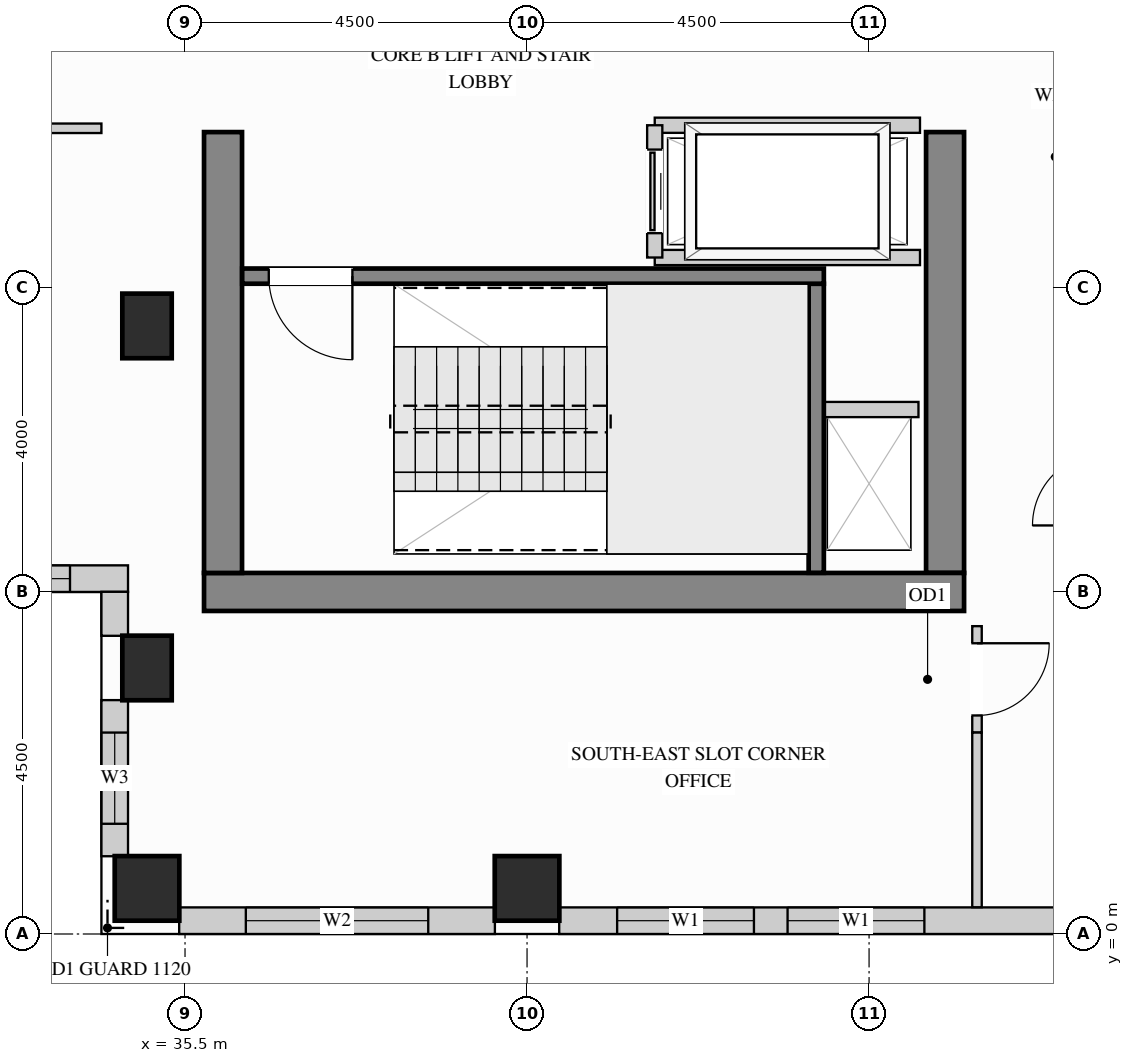
"""IFC4 building model, lengths in metres.
Left out: names, types, materials, properties, quantities, classifications, styles, units other than length and angle.
Written with IfcOpenShell. Run it as: python <this file> out.ifc"""

import sys

from ifc_helpers import new_model, si_unit, direction, frame, frame_2d, origin, origin_2d, place, context, subcontext, project, spatial, rectangle, extrude, source, transform, mapped, element, fill, save


model = new_model("IFC4")
c1 = context("Model", 3, precision=1e-05, world=origin(), true_north=direction((0.0, 1.0)))
c2 = subcontext(c1, "Body", "Model", "MODEL_VIEW")
j1 = project(units=[si_unit("LENGTHUNIT", "METRE"), si_unit("PLANEANGLEUNIT", "RADIAN")], contexts=[c1])
p1 = place(None, origin())
s1 = spatial("IfcSite", under=j1, at=p1, CompositionType="ELEMENT")
p2 = place(p1, origin())
s2 = spatial("IfcBuilding", under=s1, at=p2, CompositionType="ELEMENT")
p3 = place(p2, frame((0.0, 0.0, 219.6)))
s3 = spatial("IfcBuildingStorey", under=s2, at=p3, CompositionType="ELEMENT", Elevation=219.6)
m1 = source(origin(), c2, "Body", "SweptSolid", [
    extrude(rectangle(XDim=0.65, YDim=0.85, at=origin_2d()), origin(), (0.0, 0.0, 1.0), 3.4),
])
for number, where, z_axis, x_axis in (
    (1, (35.0, 3.5, 0.0), (0.0, 0.0, 1.0), (1.0, 0.0, 0.0)),
    (2, (35.0, 8.0, 0.0), (0.0, 0.0, 1.0), (1.0, 0.0, 0.0)),
):
    element("IfcColumn", number, at=place(p3, frame(where, z_axis=z_axis, x_axis=x_axis)), inside=s3, PredefinedType="COLUMN", context=c2, shape_type="MappedRepresentation", body=[
        mapped(m1, transform((0.0, 0.0, 0.0), x_axis=(1.0, 0.0, 0.0), y_axis=(0.0, 1.0, 0.0), z_axis=(0.0, 0.0, 1.0))),
    ])
m2 = source(origin(), c2, "Body", "SweptSolid", [
    extrude(rectangle(XDim=0.85, YDim=0.85, at=origin_2d()), origin(), (0.0, 0.0, 1.0), 3.4),
])
for number, where, z_axis, x_axis in (
    (3, (35.0, 0.6, 0.0), (0.0, 0.0, 1.0), (1.0, 0.0, 0.0)),
    (4, (40.0, 0.6, 0.0), (0.0, 0.0, 1.0), (1.0, 0.0, 0.0)),
):
    element("IfcColumn", number, at=place(p3, frame(where, z_axis=z_axis, x_axis=x_axis)), inside=s3, PredefinedType="COLUMN", context=c2, shape_type="MappedRepresentation", body=[
        mapped(m2, transform((0.0, 0.0, 0.0), x_axis=(1.0, 0.0, 0.0), y_axis=(0.0, 1.0, 0.0), z_axis=(0.0, 0.0, 1.0))),
    ])
m3 = source(origin(), c2, "Body", "SweptSolid", [
    extrude(rectangle(XDim=5.8, YDim=0.5, at=frame_2d((2.9, 0.0))), origin(), (0.0, 0.0, 1.0), 3.4),
])
p4 = place(p3, frame((45.5, 4.75, 0.0), z_axis=(0.0, 0.0, 1.0), x_axis=(0.0, 1.0, 0.0)))
e5 = element("IfcWall", 5, at=p4, inside=s3, PredefinedType="SHEAR", context=c2, shape_type="MappedRepresentation", body=[
    mapped(m3, transform((0.0, 0.0, 0.0), x_axis=(1.0, 0.0, 0.0), y_axis=(0.0, 1.0, 0.0), z_axis=(0.0, 0.0, 1.0))),
])
m4 = source(origin(), c2, "Body", "SweptSolid", [
    extrude(rectangle(XDim=10.0, YDim=0.5, at=frame_2d((5.0, 0.0))), origin(), (0.0, 0.0, 1.0), 3.4),
])
p5 = place(p3, frame((35.75, 4.5, 0.0), z_axis=(0.0, 0.0, 1.0), x_axis=(1.0, 0.0, 0.0)))
e6 = element("IfcWall", 6, at=p5, inside=s3, PredefinedType="SHEAR", context=c2, shape_type="MappedRepresentation", body=[
    mapped(m4, transform((0.0, 0.0, 0.0), x_axis=(1.0, 0.0, 0.0), y_axis=(0.0, 1.0, 0.0), z_axis=(0.0, 0.0, 1.0))),
])
p6 = place(p3, frame((36.0, 4.75, 0.0), z_axis=(0.0, 0.0, 1.0), x_axis=(0.0, 1.0, 0.0)))
e7 = element("IfcWall", 7, at=p6, inside=s3, PredefinedType="SHEAR", context=c2, shape_type="MappedRepresentation", body=[
    mapped(m3, transform((0.0, 0.0, 0.0), x_axis=(1.0, 0.0, 0.0), y_axis=(0.0, 1.0, 0.0), z_axis=(0.0, 0.0, 1.0))),
])
p7 = place(p3, frame((19.15, 4.675, 0.0), z_axis=(0.0, 0.0, 1.0), x_axis=(1.0, 0.0, 0.0)))
e8 = element("IfcWall", 8, at=p7, inside=s3, PredefinedType="SOLIDWALL", context=c2, shape_type="SweptSolid", body=[
    extrude(rectangle(XDim=15.6, YDim=0.35, at=frame_2d((7.8, 0.0))), origin(), (0.0, 0.0, 1.0), 3.385),
])
p8 = place(p7, frame((0.697, 0.0, 0.78)))
e9 = element("IfcOpeningElement", 9, at=p8, cuts=e8, PredefinedType="OPENING", context=c2, shape_type="SweptSolid", body=[
    extrude(rectangle(XDim=1.5, YDim=2.0, at=frame_2d((0.75, 1.0))), frame((0.0, 0.185, 0.0), z_axis=(0.0, -1.0, 0.0), x_axis=(1.0, 0.0, 0.0)), (0.0, 0.0, 1.0), 0.37),
])
p9 = place(p7, frame((2.573, 0.0, 0.78)))
e10 = element("IfcOpeningElement", 10, at=p9, cuts=e8, PredefinedType="OPENING", context=c2, shape_type="SweptSolid", body=[
    extrude(rectangle(XDim=1.5, YDim=2.0, at=frame_2d((0.75, 1.0))), frame((0.0, 0.185, 0.0), z_axis=(0.0, -1.0, 0.0), x_axis=(1.0, 0.0, 0.0)), (0.0, 0.0, 1.0), 0.37),
])
p10 = place(p7, frame((5.783, 0.0, 0.78)))
e11 = element("IfcOpeningElement", 11, at=p10, cuts=e8, PredefinedType="OPENING", context=c2, shape_type="SweptSolid", body=[
    extrude(rectangle(XDim=1.5, YDim=2.0, at=frame_2d((0.75, 1.0))), frame((0.0, 0.185, 0.0), z_axis=(0.0, -1.0, 0.0), x_axis=(1.0, 0.0, 0.0)), (0.0, 0.0, 1.0), 0.37),
])
p11 = place(p7, frame((8.117, 0.0, 0.78)))
e12 = element("IfcOpeningElement", 12, at=p11, cuts=e8, PredefinedType="OPENING", context=c2, shape_type="SweptSolid", body=[
    extrude(rectangle(XDim=1.5, YDim=2.0, at=frame_2d((0.75, 1.0))), frame((0.0, 0.185, 0.0), z_axis=(0.0, -1.0, 0.0), x_axis=(1.0, 0.0, 0.0)), (0.0, 0.0, 1.0), 0.37),
])
p12 = place(p7, frame((11.393, 0.0, 0.78)))
e13 = element("IfcOpeningElement", 13, at=p12, cuts=e8, PredefinedType="OPENING", context=c2, shape_type="SweptSolid", body=[
    extrude(rectangle(XDim=1.5, YDim=2.0, at=frame_2d((0.75, 1.0))), frame((0.0, 0.185, 0.0), z_axis=(0.0, -1.0, 0.0), x_axis=(1.0, 0.0, 0.0)), (0.0, 0.0, 1.0), 0.37),
])
p13 = place(p7, frame((13.337, 0.0, 0.78)))
e14 = element("IfcOpeningElement", 14, at=p13, cuts=e8, PredefinedType="OPENING", context=c2, shape_type="SweptSolid", body=[
    extrude(rectangle(XDim=1.5, YDim=2.0, at=frame_2d((0.75, 1.0))), frame((0.0, 0.185, 0.0), z_axis=(0.0, -1.0, 0.0), x_axis=(1.0, 0.0, 0.0)), (0.0, 0.0, 1.0), 0.37),
])
m5 = source(origin(), c2, "Body", "SweptSolid", [
    extrude(rectangle(XDim=0.579, YDim=0.35, at=frame_2d((0.29, 0.0))), origin(), (0.0, 0.0, 1.0), 3.385),
])
p14 = place(p3, frame((34.575, 4.502, 0.0), z_axis=(0.0, 0.0, 1.0), x_axis=(0.0, -1.0, 0.0)))
e15 = element("IfcWall", 15, at=p14, inside=s3, PredefinedType="SOLIDWALL", context=c2, shape_type="MappedRepresentation", body=[
    mapped(m5, transform((0.0, 0.0, 0.0), x_axis=(1.0, 0.0, 0.0), y_axis=(0.0, 1.0, 0.0), z_axis=(0.0, 0.0, 1.0))),
])
p15 = place(p3, frame((34.575, 3.077, 0.0), z_axis=(0.0, 0.0, 1.0), x_axis=(0.0, -1.0, 0.0)))
e16 = element("IfcWall", 16, at=p15, inside=s3, PredefinedType="SOLIDWALL", context=c2, shape_type="SweptSolid", body=[
    extrude(rectangle(XDim=2.054, YDim=0.35, at=frame_2d((1.027, 0.0))), origin(), (0.0, 0.0, 1.0), 3.385),
])
p16 = place(p15, frame((0.427, 0.0, 0.78)))
e17 = element("IfcOpeningElement", 17, at=p16, cuts=e16, PredefinedType="OPENING", context=c2, shape_type="SweptSolid", body=[
    extrude(rectangle(XDim=1.2, YDim=2.0, at=frame_2d((0.6, 1.0))), frame((0.0, 0.185, 0.0), z_axis=(0.0, -1.0, 0.0), x_axis=(1.0, 0.0, 0.0)), (0.0, 0.0, 1.0), 0.37),
])
p17 = place(p3, frame((35.423, 0.175, 0.0), z_axis=(0.0, 0.0, 1.0), x_axis=(1.0, 0.0, 0.0)))
e18 = element("IfcWall", 18, at=p17, inside=s3, PredefinedType="SOLIDWALL", context=c2, shape_type="SweptSolid", body=[
    extrude(rectangle(XDim=4.154, YDim=0.35, at=frame_2d((2.077, 0.0))), origin(), (0.0, 0.0, 1.0), 3.385),
])
p18 = place(p17, frame((0.877, 0.0, 0.78)))
e19 = element("IfcOpeningElement", 19, at=p18, cuts=e18, PredefinedType="OPENING", context=c2, shape_type="SweptSolid", body=[
    extrude(rectangle(XDim=2.4, YDim=2.1, at=frame_2d((1.2, 1.05))), frame((0.0, 0.185, 0.0), z_axis=(0.0, -1.0, 0.0), x_axis=(1.0, 0.0, 0.0)), (0.0, 0.0, 1.0), 0.37),
])
p19 = place(p3, frame((40.423, 0.175, 0.0), z_axis=(0.0, 0.0, 1.0), x_axis=(1.0, 0.0, 0.0)))
e20 = element("IfcWall", 20, at=p19, inside=s3, PredefinedType="SOLIDWALL", context=c2, shape_type="SweptSolid", body=[
    extrude(rectangle(XDim=7.077, YDim=0.35, at=frame_2d((3.539, 0.0))), origin(), (0.0, 0.0, 1.0), 3.385),
])
p20 = place(p19, frame((0.762, 0.0, 0.78)))
e21 = element("IfcOpeningElement", 21, at=p20, cuts=e20, PredefinedType="OPENING", context=c2, shape_type="SweptSolid", body=[
    extrude(rectangle(XDim=1.8, YDim=2.1, at=frame_2d((0.9, 1.05))), frame((0.0, 0.185, 0.0), z_axis=(0.0, -1.0, 0.0), x_axis=(1.0, 0.0, 0.0)), (0.0, 0.0, 1.0), 0.37),
])
p21 = place(p19, frame((3.005, 0.0, 0.78)))
e22 = element("IfcOpeningElement", 22, at=p21, cuts=e20, PredefinedType="OPENING", context=c2, shape_type="SweptSolid", body=[
    extrude(rectangle(XDim=1.8, YDim=2.1, at=frame_2d((0.9, 1.05))), frame((0.0, 0.185, 0.0), z_axis=(0.0, -1.0, 0.0), x_axis=(1.0, 0.0, 0.0)), (0.0, 0.0, 1.0), 0.37),
])
p22 = place(p3, frame((45.92, 2.65, 0.0), z_axis=(0.0, 0.0, 1.0), x_axis=(0.0, 1.0, 0.0)))
e23 = element("IfcWall", 23, at=p22, inside=s3, PredefinedType="PARTITIONING", context=c2, shape_type="SweptSolid", body=[
    extrude(rectangle(XDim=1.4, YDim=0.125, at=frame_2d((0.7, 0.0))), origin(), (0.0, 0.0, 1.0), 3.385),
])
p23 = place(p22, frame((0.225, 0.0, 0.0)))
e24 = element("IfcOpeningElement", 24, at=p23, cuts=e23, PredefinedType="OPENING", context=c2, shape_type="SweptSolid", body=[
    extrude(rectangle(XDim=0.95, YDim=2.15, at=frame_2d((0.475, 1.075))), frame((0.0, 0.073, 0.0), z_axis=(0.0, -1.0, 0.0), x_axis=(1.0, 0.0, 0.0)), (0.0, 0.0, 1.0), 0.145),
])
m6 = source(origin(), c2, "Body", "SweptSolid", [
    extrude(rectangle(XDim=2.298, YDim=0.125, at=frame_2d((1.149, 0.0))), origin(), (0.0, 0.0, 1.0), 3.385),
])
p24 = place(p3, frame((45.92, 0.352, 0.0), z_axis=(0.0, 0.0, 1.0), x_axis=(0.0, 1.0, 0.0)))
e25 = element("IfcWall", 25, at=p24, inside=s3, PredefinedType="PARTITIONING", context=c2, shape_type="MappedRepresentation", body=[
    mapped(m6, transform((0.0, 0.0, 0.0), x_axis=(1.0, 0.0, 0.0), y_axis=(0.0, 1.0, 0.0), z_axis=(0.0, 0.0, 1.0))),
])
p25 = place(p3, frame((29.85, 10.6, 0.0), z_axis=(0.0, 0.0, 1.0), x_axis=(1.0, 0.0, 0.0)))
e26 = element("IfcWall", 26, at=p25, inside=s3, PredefinedType="PARTITIONING", context=c2, shape_type="SweptSolid", body=[
    extrude(rectangle(XDim=4.55, YDim=0.125, at=frame_2d((2.275, 0.0))), origin(), (0.0, 0.0, 1.0), 3.385),
])
p26 = place(p25, frame((1.8, 0.0, 0.0)))
e27 = element("IfcOpeningElement", 27, at=p26, cuts=e26, PredefinedType="OPENING", context=c2, shape_type="SweptSolid", body=[
    extrude(rectangle(XDim=0.95, YDim=2.15, at=frame_2d((0.475, 1.075))), frame((0.0, 0.073, 0.0), z_axis=(0.0, -1.0, 0.0), x_axis=(1.0, 0.0, 0.0)), (0.0, 0.0, 1.0), 0.145),
])
m7 = source(origin(), c2, "Body", "SweptSolid", [
    extrude(rectangle(XDim=1.3, YDim=0.2, at=frame_2d((0.65, 0.0))), origin(), (0.0, 0.0, 1.0), 3.385),
])
p27 = place(p3, frame((43.85, 6.9, 0.0), z_axis=(0.0, 0.0, 1.0), x_axis=(1.0, 0.0, 0.0)))
e28 = element("IfcWall", 28, at=p27, inside=s3, PredefinedType="PARTITIONING", context=c2, shape_type="MappedRepresentation", body=[
    mapped(m7, transform((0.0, 0.0, 0.0), x_axis=(1.0, 0.0, 0.0), y_axis=(0.0, 1.0, 0.0), z_axis=(0.0, 0.0, 1.0))),
])
m8 = source(origin(), c2, "Body", "SweptSolid", [
    extrude(rectangle(XDim=3.49, YDim=0.2, at=frame_2d((1.745, 0.0))), origin(), (0.0, 0.0, 1.0), 3.385),
])
for number, where, z_axis, x_axis in (
    (29, (41.68, 10.64, 0.0), (0.0, 0.0, 1.0), (1.0, 0.0, 0.0)),
    (30, (41.68, 8.9, 0.0), (0.0, 0.0, 1.0), (1.0, 0.0, 0.0)),
):
    element("IfcWall", number, at=place(p3, frame(where, z_axis=z_axis, x_axis=x_axis)), inside=s3, PredefinedType="PARTITIONING", context=c2, shape_type="MappedRepresentation", body=[
        mapped(m8, transform((0.0, 0.0, 0.0), x_axis=(1.0, 0.0, 0.0), y_axis=(0.0, 1.0, 0.0), z_axis=(0.0, 0.0, 1.0))),
    ])
p28 = place(p3, frame((41.68, 8.9, 0.0), z_axis=(0.0, 0.0, 1.0), x_axis=(0.0, 1.0, 0.0)))
e31 = element("IfcWall", 31, at=p28, inside=s3, PredefinedType="PARTITIONING", context=c2, shape_type="SweptSolid", body=[
    extrude(rectangle(XDim=1.74, YDim=0.2, at=frame_2d((0.87, 0.0))), origin(), (0.0, 0.0, 1.0), 3.385),
])
p29 = place(p28, frame((0.32, 0.0, 0.0)))
e32 = element("IfcOpeningElement", 32, at=p29, cuts=e31, PredefinedType="OPENING", context=c2, shape_type="SweptSolid", body=[
    extrude(rectangle(XDim=1.1, YDim=2.2, at=frame_2d((0.55, 1.1))), frame((0.0, 0.11, 0.0), z_axis=(0.0, -1.0, 0.0), x_axis=(1.0, 0.0, 0.0)), (0.0, 0.0, 1.0), 0.22),
])
m9 = source(origin(), c2, "Body", "SweptSolid", [
    extrude(rectangle(XDim=3.803, YDim=0.2, at=frame_2d((1.901, 0.0))), origin(), (0.0, 0.0, 1.0), 3.4),
])
p30 = place(p3, frame((43.805, 4.752, 0.0), z_axis=(0.0, 0.0, 1.0), x_axis=(0.0, 1.0, 0.0)))
e33 = element("IfcWall", 33, at=p30, inside=s3, PredefinedType="SHEAR", context=c2, shape_type="MappedRepresentation", body=[
    mapped(m9, transform((0.0, 0.0, 0.0), x_axis=(1.0, 0.0, 0.0), y_axis=(0.0, 1.0, 0.0), z_axis=(0.0, 0.0, 1.0))),
])
p31 = place(p3, frame((36.252, 8.655, 0.0), z_axis=(0.0, 0.0, 1.0), x_axis=(1.0, 0.0, 0.0)))
e34 = element("IfcWall", 34, at=p31, inside=s3, PredefinedType="SHEAR", context=c2, shape_type="SweptSolid", body=[
    extrude(rectangle(XDim=7.653, YDim=0.2, at=frame_2d((3.827, 0.0))), origin(), (0.0, 0.0, 1.0), 3.4),
])
p32 = place(p31, frame((0.35, 0.0, 0.0)))
e35 = element("IfcOpeningElement", 35, at=p32, cuts=e34, PredefinedType="OPENING", context=c2, shape_type="SweptSolid", body=[
    extrude(rectangle(XDim=1.1, YDim=2.15, at=frame_2d((0.55, 1.075))), frame((0.0, 0.11, 0.0), z_axis=(0.0, -1.0, 0.0), x_axis=(1.0, 0.0, 0.0)), (0.0, 0.0, 1.0), 0.22),
])
m10 = source(origin(), c2, "Body", "SweptSolid", [
    extrude(rectangle(XDim=1.1, YDim=2.2, at=frame_2d((0.55, 1.1))), frame((0.0, 0.025, 0.0), z_axis=(0.0, -1.0, 0.0), x_axis=(1.0, 0.0, 0.0)), (0.0, 0.0, 1.0), 0.05),
])
p33 = place(p29, origin())
e36 = element("IfcDoor", 36, at=p33, inside=s3, OperationType="SLIDING_TO_LEFT", PredefinedType="DOOR", context=c2, shape_type="MappedRepresentation", body=[
    mapped(m10, transform((0.0, 0.0, 0.0), x_axis=(1.0, 0.0, 0.0), y_axis=(0.0, 1.0, 0.0), z_axis=(0.0, 0.0, 1.0))),
])
fill(e32, e36)
m11 = source(origin(), c2, "Body", "SweptSolid", [
    extrude(rectangle(XDim=0.95, YDim=2.15, at=frame_2d((0.475, 1.075))), frame((0.0, 0.025, 0.0), z_axis=(0.0, -1.0, 0.0), x_axis=(1.0, 0.0, 0.0)), (0.0, 0.0, 1.0), 0.05),
])
p34 = place(p23, origin())
e37 = element("IfcDoor", 37, at=p34, inside=s3, OperationType="SINGLE_SWING_RIGHT", PredefinedType="DOOR", context=c2, shape_type="MappedRepresentation", body=[
    mapped(m11, transform((0.0, 0.0, 0.0), x_axis=(1.0, 0.0, 0.0), y_axis=(0.0, 1.0, 0.0), z_axis=(0.0, 0.0, 1.0))),
])
fill(e24, e37)
m12 = source(origin(), c2, "Body", "SweptSolid", [
    extrude(rectangle(XDim=1.1, YDim=2.15, at=frame_2d((0.55, 1.075))), frame((0.0, 0.025, 0.0), z_axis=(0.0, -1.0, 0.0), x_axis=(1.0, 0.0, 0.0)), (0.0, 0.0, 1.0), 0.05),
])
p35 = place(p32, origin())
e38 = element("IfcDoor", 38, at=p35, inside=s3, OperationType="SINGLE_SWING_RIGHT", PredefinedType="DOOR", context=c2, shape_type="MappedRepresentation", body=[
    mapped(m12, transform((0.0, 0.0, 0.0), x_axis=(1.0, 0.0, 0.0), y_axis=(0.0, 1.0, 0.0), z_axis=(0.0, 0.0, 1.0))),
])
fill(e35, e38)
m13 = source(origin(), c2, "Body", "SweptSolid", [
    extrude(rectangle(XDim=1.8, YDim=2.1, at=frame_2d((0.9, 1.05))), frame((0.0, 0.03, 0.0), z_axis=(0.0, -1.0, 0.0), x_axis=(1.0, 0.0, 0.0)), (0.0, 0.0, 1.0), 0.06),
])
p36 = place(p20, origin())
e39 = element("IfcWindow", 39, at=p36, inside=s3, PartitioningType="SINGLE_PANEL", PredefinedType="WINDOW", context=c2, shape_type="MappedRepresentation", body=[
    mapped(m13, transform((0.0, 0.0, 0.0), x_axis=(1.0, 0.0, 0.0), y_axis=(0.0, 1.0, 0.0), z_axis=(0.0, 0.0, 1.0))),
])
fill(e21, e39)
p37 = place(p21, origin())
e40 = element("IfcWindow", 40, at=p37, inside=s3, PartitioningType="SINGLE_PANEL", PredefinedType="WINDOW", context=c2, shape_type="MappedRepresentation", body=[
    mapped(m13, transform((0.0, 0.0, 0.0), x_axis=(1.0, 0.0, 0.0), y_axis=(0.0, 1.0, 0.0), z_axis=(0.0, 0.0, 1.0))),
])
fill(e22, e40)
m14 = source(origin(), c2, "Body", "SweptSolid", [
    extrude(rectangle(XDim=2.4, YDim=2.1, at=frame_2d((1.2, 1.05))), frame((0.0, 0.03, 0.0), z_axis=(0.0, -1.0, 0.0), x_axis=(1.0, 0.0, 0.0)), (0.0, 0.0, 1.0), 0.06),
])
p38 = place(p18, origin())
e41 = element("IfcWindow", 41, at=p38, inside=s3, PartitioningType="SINGLE_PANEL", PredefinedType="WINDOW", context=c2, shape_type="MappedRepresentation", body=[
    mapped(m14, transform((0.0, 0.0, 0.0), x_axis=(1.0, 0.0, 0.0), y_axis=(0.0, 1.0, 0.0), z_axis=(0.0, 0.0, 1.0))),
])
fill(e19, e41)
m15 = source(origin(), c2, "Body", "SweptSolid", [
    extrude(rectangle(XDim=1.2, YDim=2.0, at=frame_2d((0.6, 1.0))), frame((0.0, 0.03, 0.0), z_axis=(0.0, -1.0, 0.0), x_axis=(1.0, 0.0, 0.0)), (0.0, 0.0, 1.0), 0.06),
])
p39 = place(p16, origin())
e42 = element("IfcWindow", 42, at=p39, inside=s3, PartitioningType="SINGLE_PANEL", PredefinedType="WINDOW", context=c2, shape_type="MappedRepresentation", body=[
    mapped(m15, transform((0.0, 0.0, 0.0), x_axis=(1.0, 0.0, 0.0), y_axis=(0.0, 1.0, 0.0), z_axis=(0.0, 0.0, 1.0))),
])
fill(e17, e42)
m16 = source(origin(), c2, "Body", "SweptSolid", [
    extrude(rectangle(XDim=1.5, YDim=2.0, at=frame_2d((0.75, 1.0))), frame((0.0, 0.03, 0.0), z_axis=(0.0, -1.0, 0.0), x_axis=(1.0, 0.0, 0.0)), (0.0, 0.0, 1.0), 0.06),
])
p40 = place(p13, origin())
e43 = element("IfcWindow", 43, at=p40, inside=s3, PartitioningType="SINGLE_PANEL", PredefinedType="WINDOW", context=c2, shape_type="MappedRepresentation", body=[
    mapped(m16, transform((0.0, 0.0, 0.0), x_axis=(1.0, 0.0, 0.0), y_axis=(0.0, 1.0, 0.0), z_axis=(0.0, 0.0, 1.0))),
])
fill(e14, e43)
save(model, sys.argv[1])
